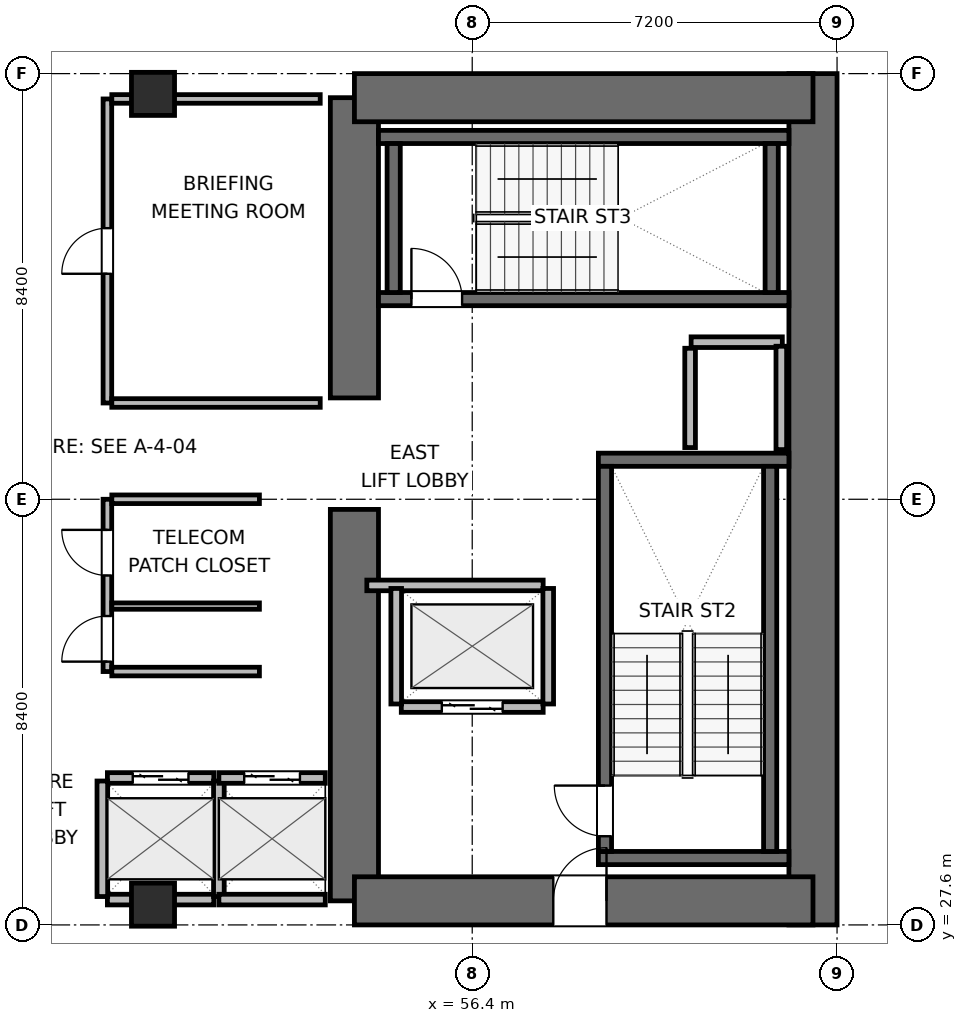
"""IFC4 building model, lengths in metres.
Left out: names, types, materials, properties, quantities, classifications, styles, units other than length and angle.
Written with IfcOpenShell. Run it as: python <this file> out.ifc"""

import sys

from ifc_helpers import new_model, si_unit, direction, frame, frame_2d, origin, origin_2d, place, context, subcontext, project, spatial, rectangle, extrude, element, fill, save


model = new_model("IFC4")
c1 = context("Model", 3, precision=1e-05, world=origin(), true_north=direction((0.0, 1.0)))
c2 = subcontext(c1, "Body", "Model", "MODEL_VIEW")
j1 = project(units=[si_unit("LENGTHUNIT", "METRE"), si_unit("PLANEANGLEUNIT", "RADIAN")], contexts=[c1])
p1 = place(None, origin())
s1 = spatial("IfcSite", under=j1, at=p1, CompositionType="ELEMENT")
p2 = place(p1, origin())
s2 = spatial("IfcBuilding", under=s1, at=p2, CompositionType="ELEMENT")
p3 = place(p2, frame((0.0, 0.0, 29.4)))
s3 = spatial("IfcBuildingStorey", under=s2, at=p3, CompositionType="ELEMENT", Elevation=29.4)
p4 = place(p3, frame((54.075, 28.075, 0.0), z_axis=(0.0, 0.0, 1.0), x_axis=(0.0, 1.0, 0.0)))
e1 = element("IfcWall", 1, at=p4, inside=s3, PredefinedType="SHEAR", context=c2, shape_type="SweptSolid", body=[
    extrude(rectangle(XDim=7.725, YDim=0.95, at=frame_2d((3.863, 0.0))), origin(), (0.0, 0.0, 1.0), 3.9),
])
p5 = place(p3, frame((54.075, 38.0, 0.0), z_axis=(0.0, 0.0, 1.0), x_axis=(0.0, 1.0, 0.0)))
e2 = element("IfcWall", 2, at=p5, inside=s3, PredefinedType="SHEAR", context=c2, shape_type="SweptSolid", body=[
    extrude(rectangle(XDim=5.925, YDim=0.95, at=frame_2d((2.962, 0.0))), origin(), (0.0, 0.0, 1.0), 3.9),
])
p6 = place(p3, frame((63.125, 27.6, 0.0), z_axis=(0.0, 0.0, 1.0), x_axis=(0.0, 1.0, 0.0)))
e3 = element("IfcWall", 3, at=p6, inside=s3, PredefinedType="SHEAR", context=c2, shape_type="SweptSolid", body=[
    extrude(rectangle(XDim=16.8, YDim=0.95, at=frame_2d((8.4, 0.0))), origin(), (0.0, 0.0, 1.0), 3.9),
])
p7 = place(p3, frame((54.075, 28.075, 0.0), z_axis=(0.0, 0.0, 1.0), x_axis=(1.0, 0.0, 0.0)))
e4 = element("IfcWall", 4, at=p7, inside=s3, PredefinedType="SHEAR", context=c2, shape_type="SweptSolid", body=[
    extrude(rectangle(XDim=9.05, YDim=0.95, at=frame_2d((4.525, 0.0))), origin(), (0.0, 0.0, 1.0), 3.9),
])
p8 = place(p7, frame((3.925, 0.0, 0.0)))
e5 = element("IfcOpeningElement", 5, at=p8, cuts=e4, PredefinedType="OPENING", context=c2, shape_type="SweptSolid", body=[
    extrude(rectangle(XDim=1.05, YDim=2.04, at=frame_2d((0.525, 1.02))), frame((0.0, 0.485, 0.0), z_axis=(0.0, -1.0, 0.0), x_axis=(1.0, 0.0, 0.0)), (0.0, 0.0, 1.0), 0.97),
])
p9 = place(p3, frame((54.075, 43.925, 0.0), z_axis=(0.0, 0.0, 1.0), x_axis=(1.0, 0.0, 0.0)))
e6 = element("IfcWall", 6, at=p9, inside=s3, PredefinedType="SHEAR", context=c2, shape_type="SweptSolid", body=[
    extrude(rectangle(XDim=9.05, YDim=0.95, at=frame_2d((4.525, 0.0))), origin(), (0.0, 0.0, 1.0), 3.9),
])
for number, where, z_axis, x_axis in (
    (7, (58.89, 28.92, 0.0), (0.0, 0.0, 1.0), (1.0, 0.0, 0.0)),
    (8, (58.89, 36.78, 0.0), (0.0, 0.0, 1.0), (1.0, 0.0, 0.0)),
):
    element("IfcWall", number, at=place(p3, frame(where, z_axis=z_axis, x_axis=x_axis)), inside=s3, PredefinedType="SHEAR", context=c2, shape_type="SweptSolid", body=[
        extrude(rectangle(XDim=3.76, YDim=0.26, at=frame_2d((1.88, 0.0))), origin(), (0.0, 0.0, 1.0), 3.9),
    ])
p10 = place(p3, frame((59.02, 29.05, 0.0), z_axis=(0.0, 0.0, 1.0), x_axis=(0.0, 1.0, 0.0)))
e9 = element("IfcWall", 9, at=p10, inside=s3, PredefinedType="SHEAR", context=c2, shape_type="SweptSolid", body=[
    extrude(rectangle(XDim=7.6, YDim=0.26, at=frame_2d((3.8, 0.0))), origin(), (0.0, 0.0, 1.0), 3.9),
])
p11 = place(p10, frame((0.3, 0.0, 0.0)))
e10 = element("IfcOpeningElement", 10, at=p11, cuts=e9, PredefinedType="OPENING", context=c2, shape_type="SweptSolid", body=[
    extrude(rectangle(XDim=1.0, YDim=2.04, at=frame_2d((0.5, 1.02))), frame((0.0, 0.14, 0.0), z_axis=(0.0, -1.0, 0.0), x_axis=(1.0, 0.0, 0.0)), (0.0, 0.0, 1.0), 0.28),
])
p12 = place(p3, frame((62.28, 29.05, 0.0), z_axis=(0.0, 0.0, 1.0), x_axis=(0.0, 1.0, 0.0)))
e11 = element("IfcWall", 11, at=p12, inside=s3, PredefinedType="SHEAR", context=c2, shape_type="SweptSolid", body=[
    extrude(rectangle(XDim=7.6, YDim=0.26, at=frame_2d((3.8, 0.0))), origin(), (0.0, 0.0, 1.0), 3.9),
])
p13 = place(p3, frame((54.55, 39.95, 0.0), z_axis=(0.0, 0.0, 1.0), x_axis=(1.0, 0.0, 0.0)))
e12 = element("IfcWall", 12, at=p13, inside=s3, PredefinedType="SHEAR", context=c2, shape_type="SweptSolid", body=[
    extrude(rectangle(XDim=8.1, YDim=0.26, at=frame_2d((4.05, 0.0))), origin(), (0.0, 0.0, 1.0), 3.9),
])
p14 = place(p13, frame((0.65, 0.0, 0.0)))
e13 = element("IfcOpeningElement", 13, at=p14, cuts=e12, PredefinedType="OPENING", context=c2, shape_type="SweptSolid", body=[
    extrude(rectangle(XDim=1.0, YDim=2.04, at=frame_2d((0.5, 1.02))), frame((0.0, 0.14, 0.0), z_axis=(0.0, -1.0, 0.0), x_axis=(1.0, 0.0, 0.0)), (0.0, 0.0, 1.0), 0.28),
])
p15 = place(p3, frame((54.55, 43.15, 0.0), z_axis=(0.0, 0.0, 1.0), x_axis=(1.0, 0.0, 0.0)))
e14 = element("IfcWall", 14, at=p15, inside=s3, PredefinedType="SHEAR", context=c2, shape_type="SweptSolid", body=[
    extrude(rectangle(XDim=8.1, YDim=0.26, at=frame_2d((4.05, 0.0))), origin(), (0.0, 0.0, 1.0), 3.9),
])
for number, where, z_axis, x_axis in (
    (15, (54.85, 40.08, 0.0), (0.0, 0.0, 1.0), (0.0, 1.0, 0.0)),
    (16, (62.31, 40.08, 0.0), (0.0, 0.0, 1.0), (0.0, 1.0, 0.0)),
):
    element("IfcWall", number, at=place(p3, frame(where, z_axis=z_axis, x_axis=x_axis)), inside=s3, PredefinedType="SHEAR", context=c2, shape_type="SweptSolid", body=[
        extrude(rectangle(XDim=2.94, YDim=0.26, at=frame_2d((1.47, 0.0))), origin(), (0.0, 0.0, 1.0), 3.9),
    ])
for number, where, z_axis, x_axis in (
    (17, (50.1, 28.0, 0.0), (0.0, 0.0, 1.0), (1.0, 0.0, 0.0)),
    (18, (50.1, 44.0, 0.0), (0.0, 0.0, 1.0), (1.0, 0.0, 0.0)),
):
    element("IfcColumn", number, at=place(p3, frame(where, z_axis=z_axis, x_axis=x_axis)), inside=s3, PredefinedType="COLUMN", context=c2, shape_type="SweptSolid", body=[
        extrude(rectangle(XDim=0.85, YDim=0.85, at=origin_2d()), origin(), (0.0, 0.0, 1.0), 3.9),
    ])
p16 = place(p3, frame((60.72, 39.1, 0.0), z_axis=(0.0, 0.0, 1.0), x_axis=(1.0, 0.0, 0.0)))
e19 = element("IfcWall", 19, at=p16, inside=s3, PredefinedType="PARTITIONING", context=c2, shape_type="SweptSolid", body=[
    extrude(rectangle(XDim=1.8, YDim=0.21, at=frame_2d((0.9, 0.0))), origin(), (0.0, 0.0, 1.0), 3.64),
])
p17 = place(p3, frame((60.7, 37.02, 0.0), z_axis=(0.0, 0.0, 1.0), x_axis=(0.0, 1.0, 0.0)))
e20 = element("IfcWall", 20, at=p17, inside=s3, PredefinedType="PARTITIONING", context=c2, shape_type="SweptSolid", body=[
    extrude(rectangle(XDim=1.96, YDim=0.21, at=frame_2d((0.98, 0.0))), origin(), (0.0, 0.0, 1.0), 3.64),
])
p18 = place(p3, frame((62.5, 36.98, 0.0), z_axis=(0.0, 0.0, 1.0), x_axis=(0.0, 1.0, 0.0)))
e21 = element("IfcWall", 21, at=p18, inside=s3, PredefinedType="PARTITIONING", context=c2, shape_type="SweptSolid", body=[
    extrude(rectangle(XDim=2.04, YDim=0.21, at=frame_2d((1.02, 0.0))), origin(), (0.0, 0.0, 1.0), 3.64),
])
p19 = place(p3, frame((55.0, 31.9, 0.0), z_axis=(0.0, 0.0, 1.0), x_axis=(1.0, 0.0, 0.0)))
e22 = element("IfcWall", 22, at=p19, inside=s3, PredefinedType="PARTITIONING", context=c2, shape_type="SweptSolid", body=[
    extrude(rectangle(XDim=2.8, YDim=0.21, at=frame_2d((1.4, 0.0))), origin(), (0.0, 0.0, 1.0), 3.64),
])
p20 = place(p19, frame((0.8, 0.0, 0.0)))
e23 = element("IfcOpeningElement", 23, at=p20, cuts=e22, PredefinedType="OPENING", context=c2, shape_type="SweptSolid", body=[
    extrude(rectangle(XDim=1.2, YDim=2.04, at=frame_2d((0.6, 1.02))), frame((0.0, 0.115, 0.0), z_axis=(0.0, -1.0, 0.0), x_axis=(1.0, 0.0, 0.0)), (0.0, 0.0, 1.0), 0.23),
])
p21 = place(p3, frame((54.32, 34.3, 0.0), z_axis=(0.0, 0.0, 1.0), x_axis=(1.0, 0.0, 0.0)))
e24 = element("IfcWall", 24, at=p21, inside=s3, PredefinedType="PARTITIONING", context=c2, shape_type="SweptSolid", body=[
    extrude(rectangle(XDim=3.48, YDim=0.21, at=frame_2d((1.74, 0.0))), origin(), (0.0, 0.0, 1.0), 3.64),
])
for number, where, z_axis, x_axis in (
    (25, (54.9, 31.96, 0.0), (0.0, 0.0, 1.0), (0.0, 1.0, 0.0)),
    (26, (57.9, 31.96, 0.0), (0.0, 0.0, 1.0), (0.0, 1.0, 0.0)),
):
    element("IfcWall", number, at=place(p3, frame(where, z_axis=z_axis, x_axis=x_axis)), inside=s3, PredefinedType="PARTITIONING", context=c2, shape_type="SweptSolid", body=[
        extrude(rectangle(XDim=2.28, YDim=0.21, at=frame_2d((1.14, 0.0))), origin(), (0.0, 0.0, 1.0), 3.64),
    ])
p22 = place(p3, frame((49.2, 30.5, 0.0), z_axis=(0.0, 0.0, 1.0), x_axis=(1.0, 0.0, 0.0)))
e27 = element("IfcWall", 27, at=p22, inside=s3, PredefinedType="PARTITIONING", context=c2, shape_type="SweptSolid", body=[
    extrude(rectangle(XDim=2.1, YDim=0.21, at=frame_2d((1.05, 0.0))), origin(), (0.0, 0.0, 1.0), 3.64),
])
p23 = place(p22, frame((0.5, 0.0, 0.0)))
e28 = element("IfcOpeningElement", 28, at=p23, cuts=e27, PredefinedType="OPENING", context=c2, shape_type="SweptSolid", body=[
    extrude(rectangle(XDim=1.1, YDim=2.04, at=frame_2d((0.55, 1.02))), frame((0.0, 0.115, 0.0), z_axis=(0.0, -1.0, 0.0), x_axis=(1.0, 0.0, 0.0)), (0.0, 0.0, 1.0), 0.23),
])
p24 = place(p3, frame((49.2, 28.1, 0.0), z_axis=(0.0, 0.0, 1.0), x_axis=(1.0, 0.0, 0.0)))
e29 = element("IfcWall", 29, at=p24, inside=s3, PredefinedType="PARTITIONING", context=c2, shape_type="SweptSolid", body=[
    extrude(rectangle(XDim=2.1, YDim=0.21, at=frame_2d((1.05, 0.0))), origin(), (0.0, 0.0, 1.0), 2.525),
])
for number, where, z_axis, x_axis in (
    (30, (49.1, 28.16, 0.0), (0.0, 0.0, 1.0), (0.0, 1.0, 0.0)),
    (31, (51.4, 28.16, 0.0), (0.0, 0.0, 1.0), (0.0, 1.0, 0.0)),
):
    element("IfcWall", number, at=place(p3, frame(where, z_axis=z_axis, x_axis=x_axis)), inside=s3, PredefinedType="PARTITIONING", context=c2, shape_type="SweptSolid", body=[
        extrude(rectangle(XDim=2.28, YDim=0.21, at=frame_2d((1.14, 0.0))), origin(), (0.0, 0.0, 1.0), 3.64),
    ])
p25 = place(p3, frame((51.4, 30.5, 0.0), z_axis=(0.0, 0.0, 1.0), x_axis=(1.0, 0.0, 0.0)))
e32 = element("IfcWall", 32, at=p25, inside=s3, PredefinedType="PARTITIONING", context=c2, shape_type="SweptSolid", body=[
    extrude(rectangle(XDim=2.1, YDim=0.21, at=frame_2d((1.05, 0.0))), origin(), (0.0, 0.0, 1.0), 3.64),
])
p26 = place(p25, frame((0.5, 0.0, 0.0)))
e33 = element("IfcOpeningElement", 33, at=p26, cuts=e32, PredefinedType="OPENING", context=c2, shape_type="SweptSolid", body=[
    extrude(rectangle(XDim=1.1, YDim=2.04, at=frame_2d((0.55, 1.02))), frame((0.0, 0.115, 0.0), z_axis=(0.0, -1.0, 0.0), x_axis=(1.0, 0.0, 0.0)), (0.0, 0.0, 1.0), 0.23),
])
p27 = place(p3, frame((51.4, 28.1, 0.0), z_axis=(0.0, 0.0, 1.0), x_axis=(1.0, 0.0, 0.0)))
e34 = element("IfcWall", 34, at=p27, inside=s3, PredefinedType="PARTITIONING", context=c2, shape_type="SweptSolid", body=[
    extrude(rectangle(XDim=2.1, YDim=0.21, at=frame_2d((1.05, 0.0))), origin(), (0.0, 0.0, 1.0), 2.525),
])
p28 = place(p3, frame((49.2, 32.6, 0.0), z_axis=(0.0, 0.0, 1.0), x_axis=(0.0, 1.0, 0.0)))
e35 = element("IfcWall", 35, at=p28, inside=s3, PredefinedType="PARTITIONING", context=c2, shape_type="SweptSolid", body=[
    extrude(rectangle(XDim=3.4, YDim=0.17, at=frame_2d((1.7, 0.0))), origin(), (0.0, 0.0, 1.0), 3.64),
])
p29 = place(p28, frame((0.196, 0.0, 0.0)))
e36 = element("IfcOpeningElement", 36, at=p29, cuts=e35, PredefinedType="OPENING", context=c2, shape_type="SweptSolid", body=[
    extrude(rectangle(XDim=0.9, YDim=2.02, at=frame_2d((0.45, 1.01))), frame((0.0, 0.095, 0.0), z_axis=(0.0, -1.0, 0.0), x_axis=(1.0, 0.0, 0.0)), (0.0, 0.0, 1.0), 0.19),
])
p30 = place(p28, frame((1.896, 0.0, 0.0)))
e37 = element("IfcOpeningElement", 37, at=p30, cuts=e35, PredefinedType="OPENING", context=c2, shape_type="SweptSolid", body=[
    extrude(rectangle(XDim=0.9, YDim=2.02, at=frame_2d((0.45, 1.01))), frame((0.0, 0.095, 0.0), z_axis=(0.0, -1.0, 0.0), x_axis=(1.0, 0.0, 0.0)), (0.0, 0.0, 1.0), 0.19),
])
for number, where, z_axis, x_axis in (
    (38, (49.287, 32.6, 0.0), (0.0, 0.0, 1.0), (1.0, 0.0, 0.0)),
    (39, (49.287, 36.0, 0.0), (0.0, 0.0, 1.0), (1.0, 0.0, 0.0)),
):
    element("IfcWall", number, at=place(p3, frame(where, z_axis=z_axis, x_axis=x_axis)), inside=s3, PredefinedType="PARTITIONING", context=c2, shape_type="SweptSolid", body=[
        extrude(rectangle(XDim=2.913, YDim=0.17, at=frame_2d((1.457, 0.0))), origin(), (0.0, 0.0, 1.0), 3.64),
    ])
p31 = place(p3, frame((49.287, 33.892, 0.0), z_axis=(0.0, 0.0, 1.0), x_axis=(1.0, 0.0, 0.0)))
e40 = element("IfcWall", 40, at=p31, inside=s3, PredefinedType="PARTITIONING", context=c2, shape_type="SweptSolid", body=[
    extrude(rectangle(XDim=2.913, YDim=0.125, at=frame_2d((1.457, 0.0))), origin(), (0.0, 0.0, 1.0), 3.64),
])
p32 = place(p3, frame((49.2, 37.9, 0.0), z_axis=(0.0, 0.0, 1.0), x_axis=(0.0, 1.0, 0.0)))
e41 = element("IfcWall", 41, at=p32, inside=s3, PredefinedType="PARTITIONING", context=c2, shape_type="SweptSolid", body=[
    extrude(rectangle(XDim=6.0, YDim=0.17, at=frame_2d((3.0, 0.0))), origin(), (0.0, 0.0, 1.0), 3.64),
])
p33 = place(p32, frame((2.55, 0.0, 0.0)))
e42 = element("IfcOpeningElement", 42, at=p33, cuts=e41, PredefinedType="OPENING", context=c2, shape_type="SweptSolid", body=[
    extrude(rectangle(XDim=0.9, YDim=2.02, at=frame_2d((0.45, 1.01))), frame((0.0, 0.095, 0.0), z_axis=(0.0, -1.0, 0.0), x_axis=(1.0, 0.0, 0.0)), (0.0, 0.0, 1.0), 0.19),
])
p34 = place(p3, frame((49.287, 37.9, 0.0), z_axis=(0.0, 0.0, 1.0), x_axis=(1.0, 0.0, 0.0)))
e43 = element("IfcWall", 43, at=p34, inside=s3, PredefinedType="PARTITIONING", context=c2, shape_type="SweptSolid", body=[
    extrude(rectangle(XDim=4.113, YDim=0.17, at=frame_2d((2.056, 0.0))), origin(), (0.0, 0.0, 1.0), 3.64),
])
p35 = place(p3, frame((49.287, 43.9, 0.0), z_axis=(0.0, 0.0, 1.0), x_axis=(1.0, 0.0, 0.0)))
e44 = element("IfcWall", 44, at=p35, inside=s3, PredefinedType="PARTITIONING", context=c2, shape_type="SweptSolid", body=[
    extrude(rectangle(XDim=4.113, YDim=0.17, at=frame_2d((2.056, 0.0))), origin(), (0.0, 0.0, 1.0), 2.525),
])
p36 = place(p11, origin())
e45 = element("IfcDoor", 45, at=p36, inside=s3, OperationType="SINGLE_SWING_RIGHT", PredefinedType="DOOR", context=c2, shape_type="SweptSolid", body=[
    extrude(rectangle(XDim=1.0, YDim=2.04, at=frame_2d((0.5, 1.02))), frame((0.0, 0.025, 0.0), z_axis=(0.0, -1.0, 0.0), x_axis=(1.0, 0.0, 0.0)), (0.0, 0.0, 1.0), 0.05),
])
fill(e10, e45)
p37 = place(p14, origin())
e46 = element("IfcDoor", 46, at=p37, inside=s3, OperationType="SINGLE_SWING_LEFT", PredefinedType="DOOR", context=c2, shape_type="SweptSolid", body=[
    extrude(rectangle(XDim=1.0, YDim=2.04, at=frame_2d((0.5, 1.02))), frame((0.0, 0.025, 0.0), z_axis=(0.0, -1.0, 0.0), x_axis=(1.0, 0.0, 0.0)), (0.0, 0.0, 1.0), 0.05),
])
fill(e13, e46)
p38 = place(p20, origin())
e47 = element("IfcDoor", 47, at=p38, inside=s3, OperationType="DOUBLE_DOOR_SLIDING", PredefinedType="DOOR", context=c2, shape_type="SweptSolid", body=[
    extrude(rectangle(XDim=1.2, YDim=2.04, at=frame_2d((0.6, 1.02))), frame((0.0, 0.025, 0.0), z_axis=(0.0, -1.0, 0.0), x_axis=(1.0, 0.0, 0.0)), (0.0, 0.0, 1.0), 0.05),
])
fill(e23, e47)
p39 = place(p23, origin())
e48 = element("IfcDoor", 48, at=p39, inside=s3, OperationType="DOUBLE_DOOR_SLIDING", PredefinedType="DOOR", context=c2, shape_type="SweptSolid", body=[
    extrude(rectangle(XDim=1.1, YDim=2.04, at=frame_2d((0.55, 1.02))), frame((0.0, 0.025, 0.0), z_axis=(0.0, -1.0, 0.0), x_axis=(1.0, 0.0, 0.0)), (0.0, 0.0, 1.0), 0.05),
])
fill(e28, e48)
p40 = place(p26, origin())
e49 = element("IfcDoor", 49, at=p40, inside=s3, OperationType="DOUBLE_DOOR_SLIDING", PredefinedType="DOOR", context=c2, shape_type="SweptSolid", body=[
    extrude(rectangle(XDim=1.1, YDim=2.04, at=frame_2d((0.55, 1.02))), frame((0.0, 0.025, 0.0), z_axis=(0.0, -1.0, 0.0), x_axis=(1.0, 0.0, 0.0)), (0.0, 0.0, 1.0), 0.05),
])
fill(e33, e49)
p41 = place(p8, origin())
e50 = element("IfcDoor", 50, at=p41, inside=s3, OperationType="SINGLE_SWING_RIGHT", PredefinedType="DOOR", context=c2, shape_type="SweptSolid", body=[
    extrude(rectangle(XDim=1.05, YDim=2.04, at=frame_2d((0.525, 1.02))), frame((0.0, 0.025, 0.0), z_axis=(0.0, -1.0, 0.0), x_axis=(1.0, 0.0, 0.0)), (0.0, 0.0, 1.0), 0.05),
])
fill(e5, e50)
p42 = place(p29, origin())
e51 = element("IfcDoor", 51, at=p42, inside=s3, OperationType="SINGLE_SWING_LEFT", PredefinedType="DOOR", context=c2, shape_type="SweptSolid", body=[
    extrude(rectangle(XDim=0.9, YDim=2.02, at=frame_2d((0.45, 1.01))), frame((0.0, 0.025, 0.0), z_axis=(0.0, -1.0, 0.0), x_axis=(1.0, 0.0, 0.0)), (0.0, 0.0, 1.0), 0.05),
])
fill(e36, e51)
p43 = place(p30, origin())
e52 = element("IfcDoor", 52, at=p43, inside=s3, OperationType="SINGLE_SWING_RIGHT", PredefinedType="DOOR", context=c2, shape_type="SweptSolid", body=[
    extrude(rectangle(XDim=0.9, YDim=2.02, at=frame_2d((0.45, 1.01))), frame((0.0, 0.025, 0.0), z_axis=(0.0, -1.0, 0.0), x_axis=(1.0, 0.0, 0.0)), (0.0, 0.0, 1.0), 0.05),
])
fill(e37, e52)
p44 = place(p33, origin())
e53 = element("IfcDoor", 53, at=p44, inside=s3, OperationType="SINGLE_SWING_LEFT", PredefinedType="DOOR", context=c2, shape_type="SweptSolid", body=[
    extrude(rectangle(XDim=0.9, YDim=2.02, at=frame_2d((0.45, 1.01))), frame((0.0, 0.025, 0.0), z_axis=(0.0, -1.0, 0.0), x_axis=(1.0, 0.0, 0.0)), (0.0, 0.0, 1.0), 0.05),
])
fill(e42, e53)
save(model, sys.argv[1])
